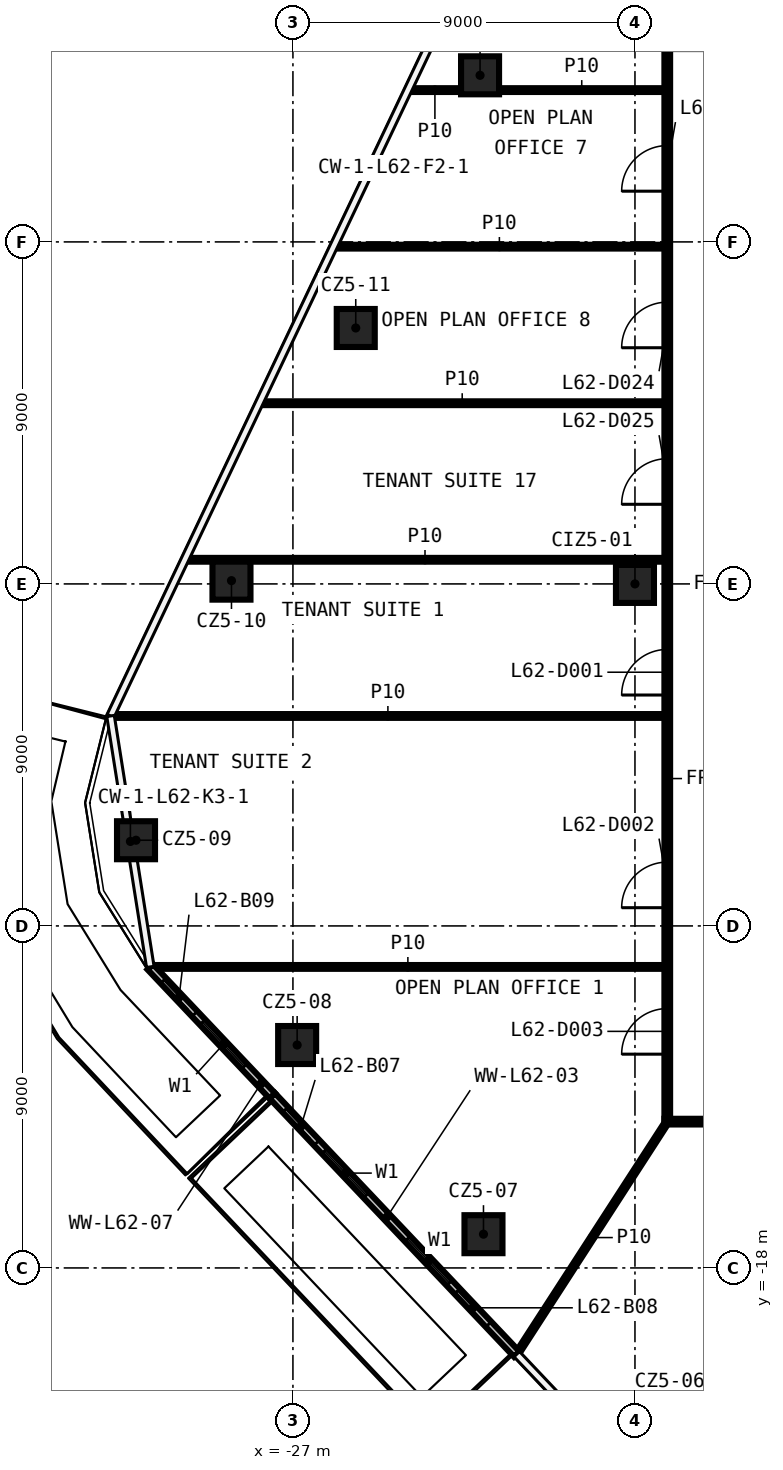
"""IFC4 building model, lengths in metres.
Left out: names, types, materials, properties, quantities, classifications, styles, units other than length and angle.
Written with IfcOpenShell. Run it as: python <this file> out.ifc"""

import sys

from ifc_helpers import new_model, si_unit, direction, frame, frame_2d, origin, origin_2d, place, context, subcontext, project, spatial, rectangle, extrude, element, fill, save


model = new_model("IFC4")
c1 = context("Model", 3, precision=1e-05, world=origin(), true_north=direction((0.0, 1.0)))
c2 = subcontext(c1, "Body", "Model", "MODEL_VIEW")
j1 = project(units=[si_unit("LENGTHUNIT", "METRE"), si_unit("PLANEANGLEUNIT", "RADIAN")], contexts=[c1])
p1 = place(None, origin())
s1 = spatial("IfcSite", under=j1, at=p1, CompositionType="ELEMENT")
p2 = place(p1, origin())
s2 = spatial("IfcBuilding", under=s1, at=p2, CompositionType="ELEMENT")
p3 = place(p2, frame((0.0, 0.0, 294.2)))
s3 = spatial("IfcBuildingStorey", under=s2, at=p3, CompositionType="ELEMENT", Elevation=294.2)
for number, where, z_axis, x_axis in (
    (1, (-21.986, -17.112, 0.0), (0.0, 0.0, 1.0), (1.0, 0.0, 0.0)),
    (2, (-26.889, -12.134, 0.0), (0.0, 0.0, 1.0), (1.0, 0.0, 0.0)),
    (3, (-31.129, -6.745, 0.0), (0.0, 0.0, 1.0), (1.0, 0.0, 0.0)),
    (4, (-28.617, 0.086, 0.0), (0.0, 0.0, 1.0), (1.0, 0.0, 0.0)),
    (5, (-25.347, 6.735, 0.0), (0.0, 0.0, 1.0), (1.0, 0.0, 0.0)),
    (6, (-22.076, 13.384, 0.0), (0.0, 0.0, 1.0), (1.0, 0.0, 0.0)),
    (7, (-18.0, 0.0, 0.0), (0.0, 0.0, 1.0), (1.0, 0.0, 0.0)),
):
    element("IfcColumn", number, at=place(p3, frame(where, z_axis=z_axis, x_axis=x_axis)), inside=s3, PredefinedType="COLUMN", context=c2, shape_type="SweptSolid", body=[
        extrude(rectangle(XDim=1.0, YDim=1.0, at=origin_2d()), origin(), (0.0, 0.0, 1.0), 3.82),
    ])
p4 = place(p3, frame((17.225, -14.15, 0.0), z_axis=(0.0, 0.0, 1.0), x_axis=(-1.0, 0.0, 0.0)))
e8 = element("IfcWall", 8, at=p4, inside=s3, PredefinedType="PARTITIONING", context=c2, shape_type="SweptSolid", body=[
    extrude(rectangle(XDim=34.45, YDim=0.15, at=frame_2d((17.225, 0.0))), origin(), (0.0, 0.0, 1.0), 3.82),
])
p5 = place(p4, frame((31.54, 0.0, 0.0)))
e9 = element("IfcOpeningElement", 9, at=p5, cuts=e8, PredefinedType="OPENING", context=c2, shape_type="SweptSolid", body=[
    extrude(rectangle(XDim=1.2, YDim=2.1, at=frame_2d((0.6, 1.05))), frame((0.0, 0.085, 0.0), z_axis=(0.0, -1.0, 0.0), x_axis=(1.0, 0.0, 0.0)), (0.0, 0.0, 1.0), 0.17),
])
p6 = place(p4, frame((25.804, 0.0, 0.0)))
e10 = element("IfcOpeningElement", 10, at=p6, cuts=e8, PredefinedType="OPENING", context=c2, shape_type="SweptSolid", body=[
    extrude(rectangle(XDim=1.2, YDim=2.1, at=frame_2d((0.6, 1.05))), frame((0.0, 0.085, 0.0), z_axis=(0.0, -1.0, 0.0), x_axis=(1.0, 0.0, 0.0)), (0.0, 0.0, 1.0), 0.17),
])
p7 = place(p4, frame((17.681, 0.0, 0.0)))
e11 = element("IfcOpeningElement", 11, at=p7, cuts=e8, PredefinedType="OPENING", context=c2, shape_type="SweptSolid", body=[
    extrude(rectangle(XDim=1.2, YDim=2.1, at=frame_2d((0.6, 1.05))), frame((0.0, 0.085, 0.0), z_axis=(0.0, -1.0, 0.0), x_axis=(1.0, 0.0, 0.0)), (0.0, 0.0, 1.0), 0.17),
])
p8 = place(p4, frame((10.752, 0.0, 0.0)))
e12 = element("IfcOpeningElement", 12, at=p8, cuts=e8, PredefinedType="OPENING", context=c2, shape_type="SweptSolid", body=[
    extrude(rectangle(XDim=1.2, YDim=2.1, at=frame_2d((0.6, 1.05))), frame((0.0, 0.085, 0.0), z_axis=(0.0, -1.0, 0.0), x_axis=(1.0, 0.0, 0.0)), (0.0, 0.0, 1.0), 0.17),
])
p9 = place(p4, frame((6.133, 0.0, 0.0)))
e13 = element("IfcOpeningElement", 13, at=p9, cuts=e8, PredefinedType="OPENING", context=c2, shape_type="SweptSolid", body=[
    extrude(rectangle(XDim=1.2, YDim=2.1, at=frame_2d((0.6, 1.05))), frame((0.0, 0.085, 0.0), z_axis=(0.0, -1.0, 0.0), x_axis=(1.0, 0.0, 0.0)), (0.0, 0.0, 1.0), 0.17),
])
p10 = place(p4, frame((1.851, 0.0, 0.0)))
e14 = element("IfcOpeningElement", 14, at=p10, cuts=e8, PredefinedType="OPENING", context=c2, shape_type="SweptSolid", body=[
    extrude(rectangle(XDim=1.2, YDim=2.1, at=frame_2d((0.6, 1.05))), frame((0.0, 0.085, 0.0), z_axis=(0.0, -1.0, 0.0), x_axis=(1.0, 0.0, 0.0)), (0.0, 0.0, 1.0), 0.17),
])
p11 = place(p3, frame((-30.726, -10.079, 0.0), z_axis=(0.0, 0.0, 1.0), x_axis=(1.0, 0.0, 0.0)))
e15 = element("IfcWall", 15, at=p11, inside=s3, PredefinedType="PARTITIONING", context=c2, shape_type="SweptSolid", body=[
    extrude(rectangle(XDim=13.5, YDim=0.1, at=frame_2d((6.75, 0.0))), origin(), (0.0, 0.0, 1.0), 3.82),
])
p12 = place(p3, frame((-31.777, -3.475, 0.0), z_axis=(0.0, 0.0, 1.0), x_axis=(1.0, 0.0, 0.0)))
e16 = element("IfcWall", 16, at=p12, inside=s3, PredefinedType="PARTITIONING", context=c2, shape_type="SweptSolid", body=[
    extrude(rectangle(XDim=14.552, YDim=0.1, at=frame_2d((7.276, 0.0))), origin(), (0.0, 0.0, 1.0), 3.82),
])
p13 = place(p3, frame((-29.824, 0.635, 0.0), z_axis=(0.0, 0.0, 1.0), x_axis=(1.0, 0.0, 0.0)))
e17 = element("IfcWall", 17, at=p13, inside=s3, PredefinedType="PARTITIONING", context=c2, shape_type="SweptSolid", body=[
    extrude(rectangle(XDim=12.599, YDim=0.1, at=frame_2d((6.3, 0.0))), origin(), (0.0, 0.0, 1.0), 3.82),
])
p14 = place(p3, frame((-27.867, 4.755, 0.0), z_axis=(0.0, 0.0, 1.0), x_axis=(1.0, 0.0, 0.0)))
e18 = element("IfcWall", 18, at=p14, inside=s3, PredefinedType="PARTITIONING", context=c2, shape_type="SweptSolid", body=[
    extrude(rectangle(XDim=10.642, YDim=0.1, at=frame_2d((5.321, 0.0))), origin(), (0.0, 0.0, 1.0), 3.82),
])
p15 = place(p3, frame((-25.909, 8.875, 0.0), z_axis=(0.0, 0.0, 1.0), x_axis=(1.0, 0.0, 0.0)))
e19 = element("IfcWall", 19, at=p15, inside=s3, PredefinedType="PARTITIONING", context=c2, shape_type="SweptSolid", body=[
    extrude(rectangle(XDim=8.684, YDim=0.1, at=frame_2d((4.342, 0.0))), origin(), (0.0, 0.0, 1.0), 3.82),
])
p16 = place(p3, frame((-23.952, 12.995, 0.0), z_axis=(0.0, 0.0, 1.0), x_axis=(1.0, 0.0, 0.0)))
e20 = element("IfcWall", 20, at=p16, inside=s3, PredefinedType="PARTITIONING", context=c2, shape_type="SweptSolid", body=[
    extrude(rectangle(XDim=1.376, YDim=0.1, at=frame_2d((0.688, 0.0))), origin(), (0.0, 0.0, 1.0), 3.82),
])
p17 = place(p3, frame((-21.576, 12.995, 0.0), z_axis=(0.0, 0.0, 1.0), x_axis=(1.0, 0.0, 0.0)))
e21 = element("IfcWall", 21, at=p17, inside=s3, PredefinedType="PARTITIONING", context=c2, shape_type="SweptSolid", body=[
    extrude(rectangle(XDim=4.351, YDim=0.1, at=frame_2d((2.175, 0.0))), origin(), (0.0, 0.0, 1.0), 3.82),
])
p18 = place(p3, frame((-21.099, -20.252, 0.0), z_axis=(0.0, 0.0, 1.0), x_axis=(0.543308378863, 0.839533206882, 0.0)))
e22 = element("IfcWall", 22, at=p18, inside=s3, PredefinedType="PARTITIONING", context=c2, shape_type="SweptSolid", body=[
    extrude(rectangle(XDim=7.268, YDim=0.1, at=frame_2d((3.634, 0.0))), origin(), (0.0, 0.0, 1.0), 3.82),
])
p19 = place(p3, frame((-17.15, -14.075, 0.0), z_axis=(0.0, 0.0, 1.0), x_axis=(0.0, 1.0, 0.0)))
e23 = element("IfcWall", 23, at=p19, inside=s3, PredefinedType="PARTITIONING", context=c2, shape_type="SweptSolid", body=[
    extrude(rectangle(XDim=28.15, YDim=0.15, at=frame_2d((14.075, 0.0))), origin(), (0.0, 0.0, 1.0), 3.82),
])
p20 = place(p19, frame((11.151, 0.0, 0.0)))
e24 = element("IfcOpeningElement", 24, at=p20, cuts=e23, PredefinedType="OPENING", context=c2, shape_type="SweptSolid", body=[
    extrude(rectangle(XDim=1.2, YDim=2.1, at=frame_2d((0.6, 1.05))), frame((0.0, 0.085, 0.0), z_axis=(0.0, -1.0, 0.0), x_axis=(1.0, 0.0, 0.0)), (0.0, 0.0, 1.0), 0.17),
])
p21 = place(p19, frame((5.555, 0.0, 0.0)))
e25 = element("IfcOpeningElement", 25, at=p21, cuts=e23, PredefinedType="OPENING", context=c2, shape_type="SweptSolid", body=[
    extrude(rectangle(XDim=1.2, YDim=2.1, at=frame_2d((0.6, 1.05))), frame((0.0, 0.085, 0.0), z_axis=(0.0, -1.0, 0.0), x_axis=(1.0, 0.0, 0.0)), (0.0, 0.0, 1.0), 0.17),
])
p22 = place(p19, frame((1.7, 0.0, 0.0)))
e26 = element("IfcOpeningElement", 26, at=p22, cuts=e23, PredefinedType="OPENING", context=c2, shape_type="SweptSolid", body=[
    extrude(rectangle(XDim=1.2, YDim=2.1, at=frame_2d((0.6, 1.05))), frame((0.0, 0.085, 0.0), z_axis=(0.0, -1.0, 0.0), x_axis=(1.0, 0.0, 0.0)), (0.0, 0.0, 1.0), 0.17),
])
p23 = place(p19, frame((24.41, 0.0, 0.0)))
e27 = element("IfcOpeningElement", 27, at=p23, cuts=e23, PredefinedType="OPENING", context=c2, shape_type="SweptSolid", body=[
    extrude(rectangle(XDim=1.2, YDim=2.1, at=frame_2d((0.6, 1.05))), frame((0.0, 0.085, 0.0), z_axis=(0.0, -1.0, 0.0), x_axis=(1.0, 0.0, 0.0)), (0.0, 0.0, 1.0), 0.17),
])
p24 = place(p19, frame((20.29, 0.0, 0.0)))
e28 = element("IfcOpeningElement", 28, at=p24, cuts=e23, PredefinedType="OPENING", context=c2, shape_type="SweptSolid", body=[
    extrude(rectangle(XDim=1.2, YDim=2.1, at=frame_2d((0.6, 1.05))), frame((0.0, 0.085, 0.0), z_axis=(0.0, -1.0, 0.0), x_axis=(1.0, 0.0, 0.0)), (0.0, 0.0, 1.0), 0.17),
])
p25 = place(p19, frame((16.17, 0.0, 0.0)))
e29 = element("IfcOpeningElement", 29, at=p25, cuts=e23, PredefinedType="OPENING", context=c2, shape_type="SweptSolid", body=[
    extrude(rectangle(XDim=1.2, YDim=2.1, at=frame_2d((0.6, 1.05))), frame((0.0, 0.085, 0.0), z_axis=(0.0, -1.0, 0.0), x_axis=(1.0, 0.0, 0.0)), (0.0, 0.0, 1.0), 0.17),
])
p26 = place(p3, frame((-27.543, -13.471, 0.0), z_axis=(0.0, 0.0, 1.0), x_axis=(0.687314061727, -0.726360365488, 0.0)))
e30 = element("IfcWall", 30, at=p26, inside=s3, PredefinedType="SOLIDWALL", context=c2, shape_type="SweptSolid", body=[
    extrude(rectangle(XDim=9.36, YDim=0.2, at=frame_2d((4.68, 0.0))), origin(), (0.0, 0.0, 1.0), 3.82),
])
p27 = place(p26, frame((2.0, 0.0, 0.6)))
e31 = element("IfcOpeningElement", 31, at=p27, cuts=e30, PredefinedType="OPENING", context=c2, shape_type="SweptSolid", body=[
    extrude(rectangle(XDim=1.6, YDim=2.4, at=frame_2d((0.8, 1.2))), frame((0.0, 0.11, 0.0), z_axis=(0.0, -1.0, 0.0), x_axis=(1.0, 0.0, 0.0)), (0.0, 0.0, 1.0), 0.22),
])
p28 = place(p26, frame((0.5, 0.0, 0.0)))
e32 = element("IfcOpeningElement", 32, at=p28, cuts=e30, PredefinedType="OPENING", context=c2, shape_type="SweptSolid", body=[
    extrude(rectangle(XDim=1.2, YDim=2.4, at=frame_2d((0.6, 1.2))), frame((0.0, 0.11, 0.0), z_axis=(0.0, -1.0, 0.0), x_axis=(1.0, 0.0, 0.0)), (0.0, 0.0, 1.0), 0.22),
])
p29 = place(p26, frame((5.18, 0.0, 0.6)))
e33 = element("IfcOpeningElement", 33, at=p29, cuts=e30, PredefinedType="OPENING", context=c2, shape_type="SweptSolid", body=[
    extrude(rectangle(XDim=1.6, YDim=2.4, at=frame_2d((0.8, 1.2))), frame((0.0, 0.11, 0.0), z_axis=(0.0, -1.0, 0.0), x_axis=(1.0, 0.0, 0.0)), (0.0, 0.0, 1.0), 0.22),
])
p30 = place(p26, frame((7.08, 0.0, 0.0)))
e34 = element("IfcOpeningElement", 34, at=p30, cuts=e30, PredefinedType="OPENING", context=c2, shape_type="SweptSolid", body=[
    extrude(rectangle(XDim=1.2, YDim=2.4, at=frame_2d((0.6, 1.2))), frame((0.0, 0.11, 0.0), z_axis=(0.0, -1.0, 0.0), x_axis=(1.0, 0.0, 0.0)), (0.0, 0.0, 1.0), 0.22),
])
p31 = place(p3, frame((-30.753, -10.079, 0.0), z_axis=(0.0, 0.0, 1.0), x_axis=(0.687310953658, -0.726363306467, 0.0)))
e35 = element("IfcWall", 35, at=p31, inside=s3, PredefinedType="SOLIDWALL", context=c2, shape_type="SweptSolid", body=[
    extrude(rectangle(XDim=4.67, YDim=0.2, at=frame_2d((2.335, 0.0))), origin(), (0.0, 0.0, 1.0), 3.82),
])
p32 = place(p31, frame((2.0, 0.0, 0.6)))
e36 = element("IfcOpeningElement", 36, at=p32, cuts=e35, PredefinedType="OPENING", context=c2, shape_type="SweptSolid", body=[
    extrude(rectangle(XDim=1.6, YDim=2.4, at=frame_2d((0.8, 1.2))), frame((0.0, 0.11, 0.0), z_axis=(0.0, -1.0, 0.0), x_axis=(1.0, 0.0, 0.0)), (0.0, 0.0, 1.0), 0.22),
])
p33 = place(p31, frame((0.5, 0.0, 0.0)))
e37 = element("IfcOpeningElement", 37, at=p33, cuts=e35, PredefinedType="OPENING", context=c2, shape_type="SweptSolid", body=[
    extrude(rectangle(XDim=1.2, YDim=2.4, at=frame_2d((0.6, 1.2))), frame((0.0, 0.11, 0.0), z_axis=(0.0, -1.0, 0.0), x_axis=(1.0, 0.0, 0.0)), (0.0, 0.0, 1.0), 0.22),
])
p34 = place(p20, origin())
e38 = element("IfcDoor", 38, at=p34, inside=s3, OperationType="SINGLE_SWING_RIGHT", PredefinedType="DOOR", context=c2, shape_type="SweptSolid", body=[
    extrude(rectangle(XDim=1.2, YDim=2.1, at=frame_2d((0.6, 1.05))), frame((0.0, 0.025, 0.0), z_axis=(0.0, -1.0, 0.0), x_axis=(1.0, 0.0, 0.0)), (0.0, 0.0, 1.0), 0.05),
])
fill(e24, e38)
p35 = place(p21, origin())
e39 = element("IfcDoor", 39, at=p35, inside=s3, OperationType="SINGLE_SWING_LEFT", PredefinedType="DOOR", context=c2, shape_type="SweptSolid", body=[
    extrude(rectangle(XDim=1.2, YDim=2.1, at=frame_2d((0.6, 1.05))), frame((0.0, 0.025, 0.0), z_axis=(0.0, -1.0, 0.0), x_axis=(1.0, 0.0, 0.0)), (0.0, 0.0, 1.0), 0.05),
])
fill(e25, e39)
p36 = place(p22, origin())
e40 = element("IfcDoor", 40, at=p36, inside=s3, OperationType="SINGLE_SWING_RIGHT", PredefinedType="DOOR", context=c2, shape_type="SweptSolid", body=[
    extrude(rectangle(XDim=1.2, YDim=2.1, at=frame_2d((0.6, 1.05))), frame((0.0, 0.025, 0.0), z_axis=(0.0, -1.0, 0.0), x_axis=(1.0, 0.0, 0.0)), (0.0, 0.0, 1.0), 0.05),
])
fill(e26, e40)
p37 = place(p23, origin())
e41 = element("IfcDoor", 41, at=p37, inside=s3, OperationType="SINGLE_SWING_RIGHT", PredefinedType="DOOR", context=c2, shape_type="SweptSolid", body=[
    extrude(rectangle(XDim=1.2, YDim=2.1, at=frame_2d((0.6, 1.05))), frame((0.0, 0.025, 0.0), z_axis=(0.0, -1.0, 0.0), x_axis=(1.0, 0.0, 0.0)), (0.0, 0.0, 1.0), 0.05),
])
fill(e27, e41)
p38 = place(p24, origin())
e42 = element("IfcDoor", 42, at=p38, inside=s3, OperationType="SINGLE_SWING_LEFT", PredefinedType="DOOR", context=c2, shape_type="SweptSolid", body=[
    extrude(rectangle(XDim=1.2, YDim=2.1, at=frame_2d((0.6, 1.05))), frame((0.0, 0.025, 0.0), z_axis=(0.0, -1.0, 0.0), x_axis=(1.0, 0.0, 0.0)), (0.0, 0.0, 1.0), 0.05),
])
fill(e28, e42)
p39 = place(p25, origin())
e43 = element("IfcDoor", 43, at=p39, inside=s3, OperationType="SINGLE_SWING_RIGHT", PredefinedType="DOOR", context=c2, shape_type="SweptSolid", body=[
    extrude(rectangle(XDim=1.2, YDim=2.1, at=frame_2d((0.6, 1.05))), frame((0.0, 0.025, 0.0), z_axis=(0.0, -1.0, 0.0), x_axis=(1.0, 0.0, 0.0)), (0.0, 0.0, 1.0), 0.05),
])
fill(e29, e43)
p40 = place(p27, origin())
e44 = element("IfcWindow", 44, at=p40, inside=s3, PartitioningType="SINGLE_PANEL", PredefinedType="WINDOW", context=c2, shape_type="SweptSolid", body=[
    extrude(rectangle(XDim=1.6, YDim=2.4, at=frame_2d((0.8, 1.2))), frame((0.0, 0.03, 0.0), z_axis=(0.0, -1.0, 0.0), x_axis=(1.0, 0.0, 0.0)), (0.0, 0.0, 1.0), 0.06),
])
fill(e31, e44)
p41 = place(p28, origin())
e45 = element("IfcDoor", 45, at=p41, inside=s3, OperationType="SLIDING_TO_LEFT", PredefinedType="DOOR", context=c2, shape_type="SweptSolid", body=[
    extrude(rectangle(XDim=1.2, YDim=2.4, at=frame_2d((0.6, 1.2))), frame((0.0, 0.025, 0.0), z_axis=(0.0, -1.0, 0.0), x_axis=(1.0, 0.0, 0.0)), (0.0, 0.0, 1.0), 0.05),
])
fill(e32, e45)
p42 = place(p29, origin())
e46 = element("IfcWindow", 46, at=p42, inside=s3, PartitioningType="SINGLE_PANEL", PredefinedType="WINDOW", context=c2, shape_type="SweptSolid", body=[
    extrude(rectangle(XDim=1.6, YDim=2.4, at=frame_2d((0.8, 1.2))), frame((0.0, 0.03, 0.0), z_axis=(0.0, -1.0, 0.0), x_axis=(1.0, 0.0, 0.0)), (0.0, 0.0, 1.0), 0.06),
])
fill(e33, e46)
p43 = place(p30, origin())
e47 = element("IfcDoor", 47, at=p43, inside=s3, OperationType="SLIDING_TO_LEFT", PredefinedType="DOOR", context=c2, shape_type="SweptSolid", body=[
    extrude(rectangle(XDim=1.2, YDim=2.4, at=frame_2d((0.6, 1.2))), frame((0.0, 0.025, 0.0), z_axis=(0.0, -1.0, 0.0), x_axis=(1.0, 0.0, 0.0)), (0.0, 0.0, 1.0), 0.05),
])
fill(e34, e47)
p44 = place(p32, origin())
e48 = element("IfcWindow", 48, at=p44, inside=s3, PartitioningType="SINGLE_PANEL", PredefinedType="WINDOW", context=c2, shape_type="SweptSolid", body=[
    extrude(rectangle(XDim=1.6, YDim=2.4, at=frame_2d((0.8, 1.2))), frame((0.0, 0.03, 0.0), z_axis=(0.0, -1.0, 0.0), x_axis=(1.0, 0.0, 0.0)), (0.0, 0.0, 1.0), 0.06),
])
fill(e36, e48)
p45 = place(p33, origin())
e49 = element("IfcDoor", 49, at=p45, inside=s3, OperationType="SLIDING_TO_LEFT", PredefinedType="DOOR", context=c2, shape_type="SweptSolid", body=[
    extrude(rectangle(XDim=1.2, YDim=2.4, at=frame_2d((0.6, 1.2))), frame((0.0, 0.025, 0.0), z_axis=(0.0, -1.0, 0.0), x_axis=(1.0, 0.0, 0.0)), (0.0, 0.0, 1.0), 0.05),
])
fill(e37, e49)
save(model, sys.argv[1])
